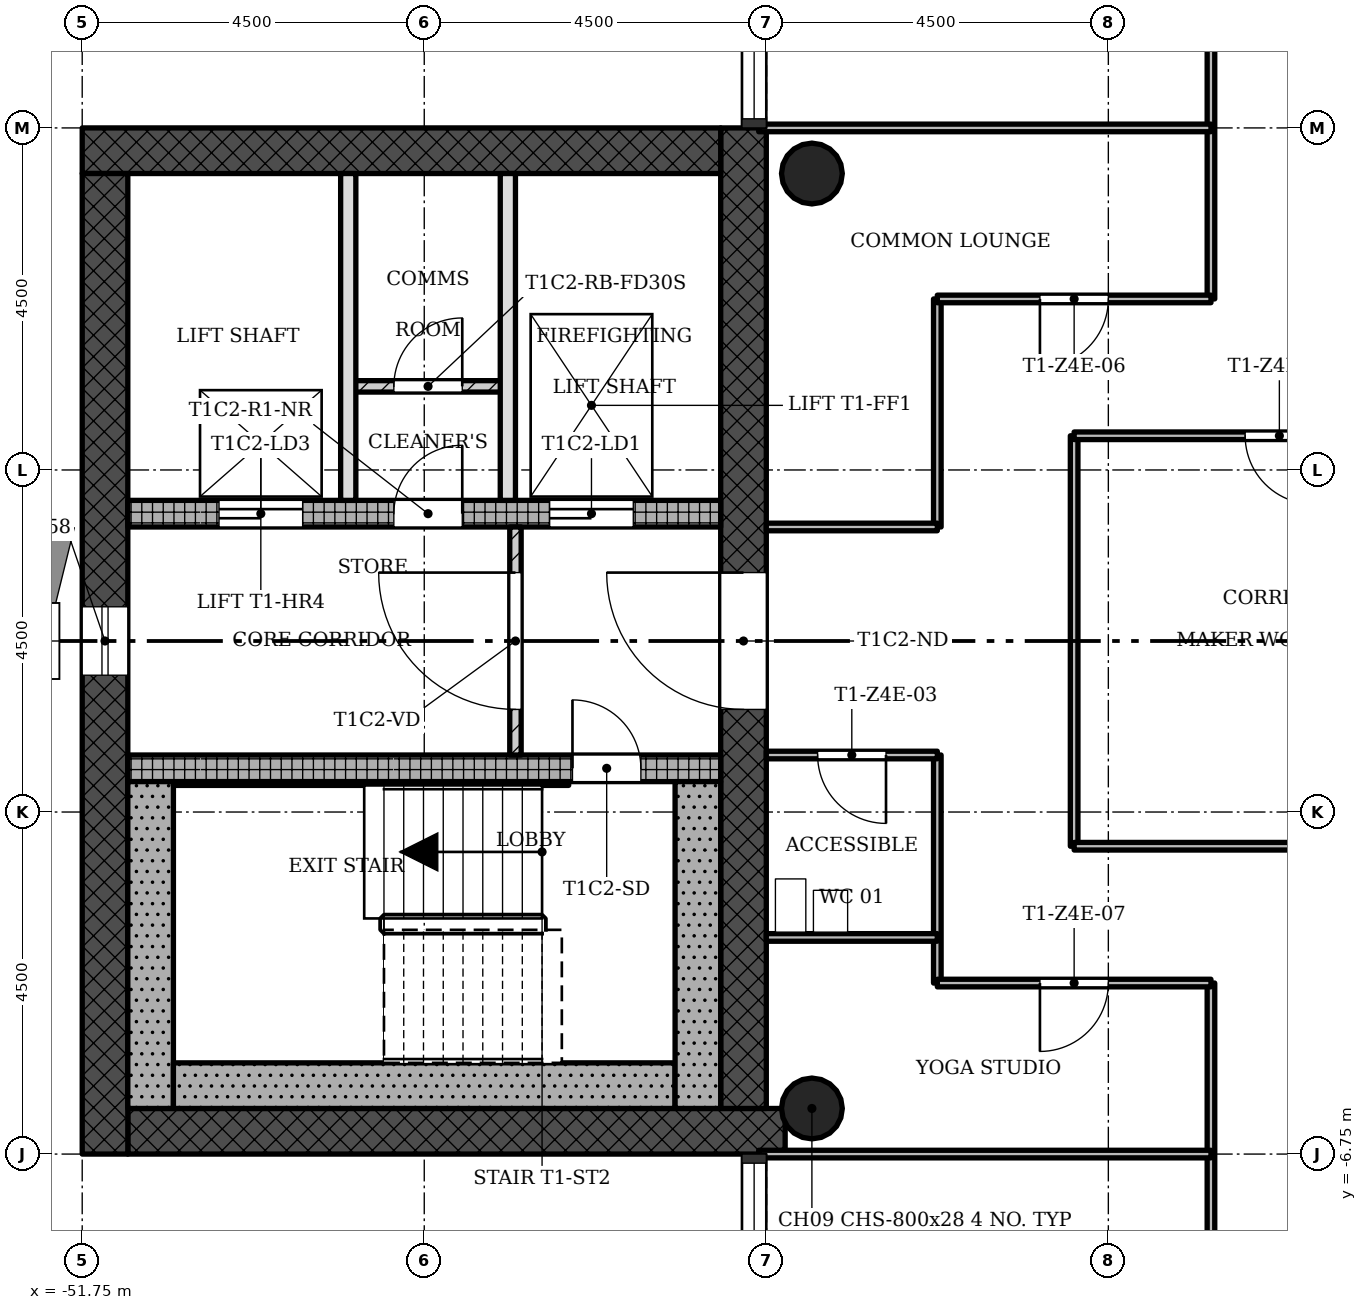
"""IFC4 building model, lengths in metres.
Left out: names, types, materials, properties, quantities, classifications, styles, units other than length and angle.
Written with IfcOpenShell. Run it as: python <this file> out.ifc"""

import sys

from ifc_helpers import new_model, si_unit, direction, frame, frame_2d, origin, origin_2d, place, context, subcontext, project, spatial, rectangle, hollow_circle, extrude, element, fill, save


model = new_model("IFC4")
c1 = context("Model", 3, precision=1e-05, world=origin(), true_north=direction((0.0, 1.0)))
c2 = subcontext(c1, "Body", "Model", "MODEL_VIEW")
j1 = project(units=[si_unit("LENGTHUNIT", "METRE"), si_unit("PLANEANGLEUNIT", "RADIAN")], contexts=[c1])
p1 = place(None, origin())
s1 = spatial("IfcSite", under=j1, at=p1, CompositionType="ELEMENT")
p2 = place(p1, origin())
s2 = spatial("IfcBuilding", under=s1, at=p2, CompositionType="ELEMENT")
p3 = place(p2, frame((0.0, 0.0, 209.6)))
s3 = spatial("IfcBuildingStorey", under=s2, at=p3, CompositionType="ELEMENT", Elevation=209.6)
p4 = place(p3, frame((-51.15, -6.45, 0.0), z_axis=(0.0, 0.0, 1.0), x_axis=(1.0, 0.0, 0.0)))
e1 = element("IfcWall", 1, at=p4, inside=s3, PredefinedType="SHEAR", context=c2, shape_type="SweptSolid", body=[
    extrude(rectangle(XDim=8.648, YDim=0.6, at=frame_2d((4.324, 0.0))), origin(), (0.0, 0.0, 1.0), 3.4),
])
p5 = place(p3, frame((-43.05, -6.15, 0.0), z_axis=(0.0, 0.0, 1.0), x_axis=(0.0, 1.0, 0.0)))
e2 = element("IfcWall", 2, at=p5, inside=s3, PredefinedType="SHEAR", context=c2, shape_type="SweptSolid", body=[
    extrude(rectangle(XDim=12.9, YDim=0.6, at=frame_2d((6.45, 0.0))), origin(), (0.0, 0.0, 1.0), 3.4),
])
p6 = place(p5, frame((5.25, 0.0, 0.0)))
e3 = element("IfcOpeningElement", 3, at=p6, cuts=e2, PredefinedType="OPENING", context=c2, shape_type="SweptSolid", body=[
    extrude(rectangle(XDim=1.8, YDim=2.1, at=frame_2d((0.9, 1.05))), frame((0.0, 0.31, 0.0), z_axis=(0.0, -1.0, 0.0), x_axis=(1.0, 0.0, 0.0)), (0.0, 0.0, 1.0), 0.62),
])
p7 = place(p3, frame((-43.35, 6.45, 0.0), z_axis=(0.0, 0.0, 1.0), x_axis=(-1.0, 0.0, 0.0)))
e4 = element("IfcWall", 4, at=p7, inside=s3, PredefinedType="SHEAR", context=c2, shape_type="SweptSolid", body=[
    extrude(rectangle(XDim=8.4, YDim=0.6, at=frame_2d((4.2, 0.0))), origin(), (0.0, 0.0, 1.0), 3.4),
])
p8 = place(p3, frame((-51.45, 6.15, 0.0), z_axis=(0.0, 0.0, 1.0), x_axis=(0.0, -1.0, 0.0)))
e5 = element("IfcWall", 5, at=p8, inside=s3, PredefinedType="SHEAR", context=c2, shape_type="SweptSolid", body=[
    extrude(rectangle(XDim=12.9, YDim=0.6, at=frame_2d((6.45, 0.0))), origin(), (0.0, 0.0, 1.0), 3.4),
])
p9 = place(p8, frame((5.7, 0.0, 0.45)))
e6 = element("IfcOpeningElement", 6, at=p9, cuts=e5, PredefinedType="OPENING", context=c2, shape_type="SweptSolid", body=[
    extrude(rectangle(XDim=0.9, YDim=2.4, at=frame_2d((0.45, 1.2))), frame((0.0, 0.31, 0.0), z_axis=(0.0, -1.0, 0.0), x_axis=(1.0, 0.0, 0.0)), (0.0, 0.0, 1.0), 0.62),
])
p10 = place(p3, frame((-51.15, -1.675, 0.0), z_axis=(0.0, 0.0, 1.0), x_axis=(1.0, 0.0, 0.0)))
e7 = element("IfcWall", 7, at=p10, inside=s3, PredefinedType="SHEAR", context=c2, shape_type="SweptSolid", body=[
    extrude(rectangle(XDim=7.8, YDim=0.35, at=frame_2d((3.9, 0.0))), origin(), (0.0, 0.0, 1.0), 3.4),
])
p11 = place(p10, frame((5.85, 0.0, 0.0)))
e8 = element("IfcOpeningElement", 8, at=p11, cuts=e7, PredefinedType="OPENING", context=c2, shape_type="SweptSolid", body=[
    extrude(rectangle(XDim=0.9, YDim=2.1, at=frame_2d((0.45, 1.05))), frame((0.0, 0.185, 0.0), z_axis=(0.0, -1.0, 0.0), x_axis=(1.0, 0.0, 0.0)), (0.0, 0.0, 1.0), 0.37),
])
p12 = place(p3, frame((-51.15, 1.675, 0.0), z_axis=(0.0, 0.0, 1.0), x_axis=(1.0, 0.0, 0.0)))
e9 = element("IfcWall", 9, at=p12, inside=s3, PredefinedType="SHEAR", context=c2, shape_type="SweptSolid", body=[
    extrude(rectangle(XDim=7.8, YDim=0.35, at=frame_2d((3.9, 0.0))), origin(), (0.0, 0.0, 1.0), 3.4),
])
p13 = place(p12, frame((5.55, 0.0, 0.0)))
e10 = element("IfcOpeningElement", 10, at=p13, cuts=e9, PredefinedType="OPENING", context=c2, shape_type="SweptSolid", body=[
    extrude(rectangle(XDim=1.1, YDim=2.1, at=frame_2d((0.55, 1.05))), frame((0.0, 0.185, 0.0), z_axis=(0.0, -1.0, 0.0), x_axis=(1.0, 0.0, 0.0)), (0.0, 0.0, 1.0), 0.37),
])
p14 = place(p12, frame((1.2, 0.0, 0.0)))
e11 = element("IfcOpeningElement", 11, at=p14, cuts=e9, PredefinedType="OPENING", context=c2, shape_type="SweptSolid", body=[
    extrude(rectangle(XDim=1.1, YDim=2.1, at=frame_2d((0.55, 1.05))), frame((0.0, 0.185, 0.0), z_axis=(0.0, -1.0, 0.0), x_axis=(1.0, 0.0, 0.0)), (0.0, 0.0, 1.0), 0.37),
])
p15 = place(p12, frame((3.5, 0.0, 0.0)))
e12 = element("IfcOpeningElement", 12, at=p15, cuts=e9, PredefinedType="OPENING", context=c2, shape_type="SweptSolid", body=[
    extrude(rectangle(XDim=0.9, YDim=2.1, at=frame_2d((0.45, 1.05))), frame((0.0, 0.185, 0.0), z_axis=(0.0, -1.0, 0.0), x_axis=(1.0, 0.0, 0.0)), (0.0, 0.0, 1.0), 0.37),
])
for number, where, z_axis, x_axis in (
    (13, (-42.15, -6.15, 0.0), (0.0, 0.0, 1.0), (1.0, 0.0, 0.0)),
    (14, (-42.15, 6.15, 0.0), (0.0, 0.0, 1.0), (1.0, 0.0, 0.0)),
):
    element("IfcColumn", number, at=place(p3, frame(where, z_axis=z_axis, x_axis=x_axis)), inside=s3, PredefinedType="COLUMN", context=c2, shape_type="SweptSolid", body=[
        extrude(hollow_circle(Radius=0.4, WallThickness=0.028, at=origin_2d()), origin(), (0.0, 0.0, 1.0), 3.4),
    ])
p16 = place(p3, frame((-46.05, 1.5, 0.0), z_axis=(0.0, 0.0, 1.0), x_axis=(0.0, -1.0, 0.0)))
e15 = element("IfcWall", 15, at=p16, inside=s3, PredefinedType="PARTITIONING", context=c2, shape_type="SweptSolid", body=[
    extrude(rectangle(XDim=3.0, YDim=0.15, at=frame_2d((1.5, 0.0))), origin(), (0.0, 0.0, 1.0), 3.0),
])
p17 = place(p16, frame((0.6, 0.0, 0.0)))
e16 = element("IfcOpeningElement", 16, at=p17, cuts=e15, PredefinedType="OPENING", context=c2, shape_type="SweptSolid", body=[
    extrude(rectangle(XDim=1.8, YDim=2.1, at=frame_2d((0.9, 1.05))), frame((0.0, 0.085, 0.0), z_axis=(0.0, -1.0, 0.0), x_axis=(1.0, 0.0, 0.0)), (0.0, 0.0, 1.0), 0.17),
])
for number, where, z_axis, x_axis in (
    (17, (-48.25, 6.15, 0.0), (0.0, 0.0, 1.0), (0.0, -1.0, 0.0)),
    (18, (-46.15, 6.15, 0.0), (0.0, 0.0, 1.0), (0.0, -1.0, 0.0)),
):
    element("IfcWall", number, at=place(p3, frame(where, z_axis=z_axis, x_axis=x_axis)), inside=s3, PredefinedType="SOLIDWALL", context=c2, shape_type="SweptSolid", body=[
        extrude(rectangle(XDim=4.3, YDim=0.2, at=frame_2d((2.15, 0.0))), origin(), (0.0, 0.0, 1.0), 3.0),
    ])
p18 = place(p3, frame((-46.15, 3.35, 0.0), z_axis=(0.0, 0.0, 1.0), x_axis=(-1.0, 0.0, 0.0)))
e19 = element("IfcWall", 19, at=p18, inside=s3, PredefinedType="PARTITIONING", context=c2, shape_type="SweptSolid", body=[
    extrude(rectangle(XDim=2.1, YDim=0.15, at=frame_2d((1.05, 0.0))), origin(), (0.0, 0.0, 1.0), 3.0),
])
p19 = place(p18, frame((0.6, 0.0, 0.0)))
e20 = element("IfcOpeningElement", 20, at=p19, cuts=e19, PredefinedType="OPENING", context=c2, shape_type="SweptSolid", body=[
    extrude(rectangle(XDim=0.9, YDim=2.1, at=frame_2d((0.45, 1.05))), frame((0.0, 0.085, 0.0), z_axis=(0.0, -1.0, 0.0), x_axis=(1.0, 0.0, 0.0)), (0.0, 0.0, 1.0), 0.17),
])
for number, where, z_axis, x_axis in (
    (21, (-40.5, -4.5, 0.0), (0.0, 0.0, 1.0), (0.0, 1.0, 0.0)),
    (22, (-40.5, 1.5, 0.0), (0.0, 0.0, 1.0), (0.0, 1.0, 0.0)),
):
    element("IfcWall", number, at=place(p3, frame(where, z_axis=z_axis, x_axis=x_axis)), inside=s3, PredefinedType="PARTITIONING", context=c2, shape_type="SweptSolid", body=[
        extrude(rectangle(XDim=3.0, YDim=0.1, at=frame_2d((1.5, 0.0))), origin(), (0.0, 0.0, 1.0), 3.0),
    ])
p20 = place(p3, frame((-38.7, -2.7, 0.0), z_axis=(0.0, 0.0, 1.0), x_axis=(0.0, 1.0, 0.0)))
e23 = element("IfcWall", 23, at=p20, inside=s3, PredefinedType="PARTITIONING", context=c2, shape_type="SweptSolid", body=[
    extrude(rectangle(XDim=5.4, YDim=0.1, at=frame_2d((2.7, 0.0))), origin(), (0.0, 0.0, 1.0), 3.0),
])
p21 = place(p3, frame((-36.9, -8.55, 0.0), z_axis=(0.0, 0.0, 1.0), x_axis=(0.0, 1.0, 0.0)))
e24 = element("IfcWall", 24, at=p21, inside=s3, PredefinedType="PARTITIONING", context=c2, shape_type="SweptSolid", body=[
    extrude(rectangle(XDim=4.05, YDim=0.1, at=frame_2d((2.025, 0.0))), origin(), (0.0, 0.0, 1.0), 3.0),
])
p22 = place(p3, frame((-36.9, 4.5, 0.0), z_axis=(0.0, 0.0, 1.0), x_axis=(0.0, 1.0, 0.0)))
e25 = element("IfcWall", 25, at=p22, inside=s3, PredefinedType="PARTITIONING", context=c2, shape_type="SweptSolid", body=[
    extrude(rectangle(XDim=6.75, YDim=0.1, at=frame_2d((3.375, 0.0))), origin(), (0.0, 0.0, 1.0), 3.0),
])
p23 = place(p22, frame((4.05, 0.0, 0.0)))
e26 = element("IfcOpeningElement", 26, at=p23, cuts=e25, PredefinedType="OPENING", context=c2, shape_type="SweptSolid", body=[
    extrude(rectangle(XDim=0.9, YDim=2.1, at=frame_2d((0.45, 1.05))), frame((0.0, 0.06, 0.0), z_axis=(0.0, -1.0, 0.0), x_axis=(1.0, 0.0, 0.0)), (0.0, 0.0, 1.0), 0.12),
])
p24 = place(p3, frame((-42.85, -6.75, 0.0), z_axis=(0.0, 0.0, 1.0), x_axis=(1.0, 0.0, 0.0)))
e27 = element("IfcWall", 27, at=p24, inside=s3, PredefinedType="PARTITIONING", context=c2, shape_type="SweptSolid", body=[
    extrude(rectangle(XDim=5.95, YDim=0.1, at=frame_2d((2.975, 0.0))), origin(), (0.0, 0.0, 1.0), 3.0),
])
p25 = place(p3, frame((-40.5, -4.5, 0.0), z_axis=(0.0, 0.0, 1.0), x_axis=(1.0, 0.0, 0.0)))
e28 = element("IfcWall", 28, at=p25, inside=s3, PredefinedType="PARTITIONING", context=c2, shape_type="SweptSolid", body=[
    extrude(rectangle(XDim=3.6, YDim=0.1, at=frame_2d((1.8, 0.0))), origin(), (0.0, 0.0, 1.0), 3.0),
])
p26 = place(p25, frame((1.35, 0.0, 0.0)))
e29 = element("IfcOpeningElement", 29, at=p26, cuts=e28, PredefinedType="OPENING", context=c2, shape_type="SweptSolid", body=[
    extrude(rectangle(XDim=0.9, YDim=2.1, at=frame_2d((0.45, 1.05))), frame((0.0, 0.06, 0.0), z_axis=(0.0, -1.0, 0.0), x_axis=(1.0, 0.0, 0.0)), (0.0, 0.0, 1.0), 0.12),
])
p27 = place(p3, frame((-42.75, -3.9, 0.0), z_axis=(0.0, 0.0, 1.0), x_axis=(1.0, 0.0, 0.0)))
e30 = element("IfcWall", 30, at=p27, inside=s3, PredefinedType="PARTITIONING", context=c2, shape_type="SweptSolid", body=[
    extrude(rectangle(XDim=2.25, YDim=0.1, at=frame_2d((1.125, 0.0))), origin(), (0.0, 0.0, 1.0), 3.0),
])
p28 = place(p3, frame((-38.7, -2.7, 0.0), z_axis=(0.0, 0.0, 1.0), x_axis=(1.0, 0.0, 0.0)))
e31 = element("IfcWall", 31, at=p28, inside=s3, PredefinedType="PARTITIONING", context=c2, shape_type="SweptSolid", body=[
    extrude(rectangle(XDim=5.4, YDim=0.1, at=frame_2d((2.7, 0.0))), origin(), (0.0, 0.0, 1.0), 3.0),
])
p29 = place(p3, frame((-42.75, -1.5, 0.0), z_axis=(0.0, 0.0, 1.0), x_axis=(1.0, 0.0, 0.0)))
e32 = element("IfcWall", 32, at=p29, inside=s3, PredefinedType="PARTITIONING", context=c2, shape_type="SweptSolid", body=[
    extrude(rectangle(XDim=2.25, YDim=0.1, at=frame_2d((1.125, 0.0))), origin(), (0.0, 0.0, 1.0), 3.0),
])
p30 = place(p29, frame((0.675, 0.0, 0.0)))
e33 = element("IfcOpeningElement", 33, at=p30, cuts=e32, PredefinedType="OPENING", context=c2, shape_type="SweptSolid", body=[
    extrude(rectangle(XDim=0.9, YDim=2.1, at=frame_2d((0.45, 1.05))), frame((0.0, 0.06, 0.0), z_axis=(0.0, -1.0, 0.0), x_axis=(1.0, 0.0, 0.0)), (0.0, 0.0, 1.0), 0.12),
])
p31 = place(p3, frame((-42.75, 1.5, 0.0), z_axis=(0.0, 0.0, 1.0), x_axis=(1.0, 0.0, 0.0)))
e34 = element("IfcWall", 34, at=p31, inside=s3, PredefinedType="PARTITIONING", context=c2, shape_type="SweptSolid", body=[
    extrude(rectangle(XDim=2.25, YDim=0.1, at=frame_2d((1.125, 0.0))), origin(), (0.0, 0.0, 1.0), 3.0),
])
p32 = place(p3, frame((-38.7, 2.7, 0.0), z_axis=(0.0, 0.0, 1.0), x_axis=(1.0, 0.0, 0.0)))
e35 = element("IfcWall", 35, at=p32, inside=s3, PredefinedType="PARTITIONING", context=c2, shape_type="SweptSolid", body=[
    extrude(rectangle(XDim=5.4, YDim=0.1, at=frame_2d((2.7, 0.0))), origin(), (0.0, 0.0, 1.0), 3.0),
])
p33 = place(p32, frame((2.25, 0.0, 0.0)))
e36 = element("IfcOpeningElement", 36, at=p33, cuts=e35, PredefinedType="OPENING", context=c2, shape_type="SweptSolid", body=[
    extrude(rectangle(XDim=0.9, YDim=2.1, at=frame_2d((0.45, 1.05))), frame((0.0, 0.06, 0.0), z_axis=(0.0, -1.0, 0.0), x_axis=(1.0, 0.0, 0.0)), (0.0, 0.0, 1.0), 0.12),
])
p34 = place(p3, frame((-40.5, 4.5, 0.0), z_axis=(0.0, 0.0, 1.0), x_axis=(1.0, 0.0, 0.0)))
e37 = element("IfcWall", 37, at=p34, inside=s3, PredefinedType="PARTITIONING", context=c2, shape_type="SweptSolid", body=[
    extrude(rectangle(XDim=3.6, YDim=0.1, at=frame_2d((1.8, 0.0))), origin(), (0.0, 0.0, 1.0), 3.0),
])
p35 = place(p34, frame((1.35, 0.0, 0.0)))
e38 = element("IfcOpeningElement", 38, at=p35, cuts=e37, PredefinedType="OPENING", context=c2, shape_type="SweptSolid", body=[
    extrude(rectangle(XDim=0.9, YDim=2.1, at=frame_2d((0.45, 1.05))), frame((0.0, 0.06, 0.0), z_axis=(0.0, -1.0, 0.0), x_axis=(1.0, 0.0, 0.0)), (0.0, 0.0, 1.0), 0.12),
])
p36 = place(p3, frame((-42.85, 6.75, 0.0), z_axis=(0.0, 0.0, 1.0), x_axis=(1.0, 0.0, 0.0)))
e39 = element("IfcWall", 39, at=p36, inside=s3, PredefinedType="PARTITIONING", context=c2, shape_type="SweptSolid", body=[
    extrude(rectangle(XDim=5.95, YDim=0.1, at=frame_2d((2.975, 0.0))), origin(), (0.0, 0.0, 1.0), 3.0),
])
p37 = place(p3, frame((-50.85, -1.85, 0.0), z_axis=(0.0, 0.0, 1.0), x_axis=(0.0, -1.0, 0.0)))
e40 = element("IfcWall", 40, at=p37, inside=s3, PredefinedType="SHEAR", context=c2, shape_type="SweptSolid", body=[
    extrude(rectangle(XDim=4.3, YDim=0.6, at=frame_2d((2.15, 0.0))), origin(), (0.0, 0.0, 1.0), 3.4),
])
p38 = place(p3, frame((-43.95, -5.85, 0.0), z_axis=(0.0, 0.0, 1.0), x_axis=(-1.0, 0.0, 0.0)))
e41 = element("IfcWall", 41, at=p38, inside=s3, PredefinedType="SHEAR", context=c2, shape_type="SweptSolid", body=[
    extrude(rectangle(XDim=6.6, YDim=0.6, at=frame_2d((3.3, 0.0))), origin(), (0.0, 0.0, 1.0), 3.4),
])
p39 = place(p3, frame((-43.65, -1.85, 0.0), z_axis=(0.0, 0.0, 1.0), x_axis=(0.0, -1.0, 0.0)))
e42 = element("IfcWall", 42, at=p39, inside=s3, PredefinedType="SHEAR", context=c2, shape_type="SweptSolid", body=[
    extrude(rectangle(XDim=4.3, YDim=0.6, at=frame_2d((2.15, 0.0))), origin(), (0.0, 0.0, 1.0), 3.4),
])
p40 = place(p3, frame((-45.35, -1.875, 0.0), z_axis=(0.0, 0.0, 1.0), x_axis=(-1.0, 0.0, 0.0)))
e43 = element("IfcWall", 43, at=p40, inside=s3, PredefinedType="SHEAR", context=c2, shape_type="SweptSolid", body=[
    extrude(rectangle(XDim=5.2, YDim=0.05, at=frame_2d((2.6, 0.0))), origin(), (0.0, 0.0, 1.0), 3.4),
])
p41 = place(p9, origin())
e44 = element("IfcWindow", 44, at=p41, inside=s3, PartitioningType="SINGLE_PANEL", PredefinedType="WINDOW", context=c2, shape_type="SweptSolid", body=[
    extrude(rectangle(XDim=0.9, YDim=2.4, at=frame_2d((0.45, 1.2))), frame((0.0, 0.03, 0.0), z_axis=(0.0, -1.0, 0.0), x_axis=(1.0, 0.0, 0.0)), (0.0, 0.0, 1.0), 0.06),
])
fill(e6, e44)
p42 = place(p17, origin())
e45 = element("IfcDoor", 45, at=p42, inside=s3, OperationType="SINGLE_SWING_LEFT", PredefinedType="DOOR", context=c2, shape_type="SweptSolid", body=[
    extrude(rectangle(XDim=1.8, YDim=2.1, at=frame_2d((0.9, 1.05))), frame((0.0, 0.025, 0.0), z_axis=(0.0, -1.0, 0.0), x_axis=(1.0, 0.0, 0.0)), (0.0, 0.0, 1.0), 0.05),
])
fill(e16, e45)
p43 = place(p19, origin())
e46 = element("IfcDoor", 46, at=p43, inside=s3, OperationType="SINGLE_SWING_LEFT", PredefinedType="DOOR", context=c2, shape_type="SweptSolid", body=[
    extrude(rectangle(XDim=0.9, YDim=2.1, at=frame_2d((0.45, 1.05))), frame((0.0, 0.025, 0.0), z_axis=(0.0, -1.0, 0.0), x_axis=(1.0, 0.0, 0.0)), (0.0, 0.0, 1.0), 0.05),
])
fill(e20, e46)
p44 = place(p33, origin())
e47 = element("IfcDoor", 47, at=p44, inside=s3, OperationType="SINGLE_SWING_RIGHT", PredefinedType="DOOR", context=c2, shape_type="SweptSolid", body=[
    extrude(rectangle(XDim=0.9, YDim=2.1, at=frame_2d((0.45, 1.05))), frame((0.0, 0.025, 0.0), z_axis=(0.0, -1.0, 0.0), x_axis=(1.0, 0.0, 0.0)), (0.0, 0.0, 1.0), 0.05),
])
fill(e36, e47)
p45 = place(p30, origin())
e48 = element("IfcDoor", 48, at=p45, inside=s3, OperationType="SINGLE_SWING_RIGHT", PredefinedType="DOOR", context=c2, shape_type="SweptSolid", body=[
    extrude(rectangle(XDim=0.9, YDim=2.1, at=frame_2d((0.45, 1.05))), frame((0.0, 0.025, 0.0), z_axis=(0.0, -1.0, 0.0), x_axis=(1.0, 0.0, 0.0)), (0.0, 0.0, 1.0), 0.05),
])
fill(e33, e48)
p46 = place(p35, origin())
e49 = element("IfcDoor", 49, at=p46, inside=s3, OperationType="SINGLE_SWING_LEFT", PredefinedType="DOOR", context=c2, shape_type="SweptSolid", body=[
    extrude(rectangle(XDim=0.9, YDim=2.1, at=frame_2d((0.45, 1.05))), frame((0.0, 0.025, 0.0), z_axis=(0.0, -1.0, 0.0), x_axis=(1.0, 0.0, 0.0)), (0.0, 0.0, 1.0), 0.05),
])
fill(e38, e49)
p47 = place(p26, origin())
e50 = element("IfcDoor", 50, at=p47, inside=s3, OperationType="SINGLE_SWING_LEFT", PredefinedType="DOOR", context=c2, shape_type="SweptSolid", body=[
    extrude(rectangle(XDim=0.9, YDim=2.1, at=frame_2d((0.45, 1.05))), frame((0.0, 0.025, 0.0), z_axis=(0.0, -1.0, 0.0), x_axis=(1.0, 0.0, 0.0)), (0.0, 0.0, 1.0), 0.05),
])
fill(e29, e50)
p48 = place(p11, origin())
e51 = element("IfcDoor", 51, at=p48, inside=s3, OperationType="SINGLE_SWING_RIGHT", PredefinedType="DOOR", context=c2, shape_type="SweptSolid", body=[
    extrude(rectangle(XDim=0.9, YDim=2.1, at=frame_2d((0.45, 1.05))), frame((0.0, 0.025, 0.0), z_axis=(0.0, -1.0, 0.0), x_axis=(1.0, 0.0, 0.0)), (0.0, 0.0, 1.0), 0.05),
])
fill(e8, e51)
p49 = place(p13, origin())
e52 = element("IfcDoor", 52, at=p49, inside=s3, OperationType="SLIDING_TO_LEFT", PredefinedType="DOOR", context=c2, shape_type="SweptSolid", body=[
    extrude(rectangle(XDim=1.1, YDim=2.1, at=frame_2d((0.55, 1.05))), frame((0.0, 0.025, 0.0), z_axis=(0.0, -1.0, 0.0), x_axis=(1.0, 0.0, 0.0)), (0.0, 0.0, 1.0), 0.05),
])
fill(e10, e52)
p50 = place(p14, origin())
e53 = element("IfcDoor", 53, at=p50, inside=s3, OperationType="SLIDING_TO_LEFT", PredefinedType="DOOR", context=c2, shape_type="SweptSolid", body=[
    extrude(rectangle(XDim=1.1, YDim=2.1, at=frame_2d((0.55, 1.05))), frame((0.0, 0.025, 0.0), z_axis=(0.0, -1.0, 0.0), x_axis=(1.0, 0.0, 0.0)), (0.0, 0.0, 1.0), 0.05),
])
fill(e11, e53)
p51 = place(p15, origin())
e54 = element("IfcDoor", 54, at=p51, inside=s3, OperationType="SINGLE_SWING_LEFT", PredefinedType="DOOR", context=c2, shape_type="SweptSolid", body=[
    extrude(rectangle(XDim=0.9, YDim=2.1, at=frame_2d((0.45, 1.05))), frame((0.0, 0.025, 0.0), z_axis=(0.0, -1.0, 0.0), x_axis=(1.0, 0.0, 0.0)), (0.0, 0.0, 1.0), 0.05),
])
fill(e12, e54)
p52 = place(p6, origin())
e55 = element("IfcDoor", 55, at=p52, inside=s3, OperationType="SINGLE_SWING_LEFT", PredefinedType="DOOR", context=c2, shape_type="SweptSolid", body=[
    extrude(rectangle(XDim=1.8, YDim=2.1, at=frame_2d((0.9, 1.05))), frame((0.0, 0.025, 0.0), z_axis=(0.0, -1.0, 0.0), x_axis=(1.0, 0.0, 0.0)), (0.0, 0.0, 1.0), 0.05),
])
fill(e3, e55)
save(model, sys.argv[1])
